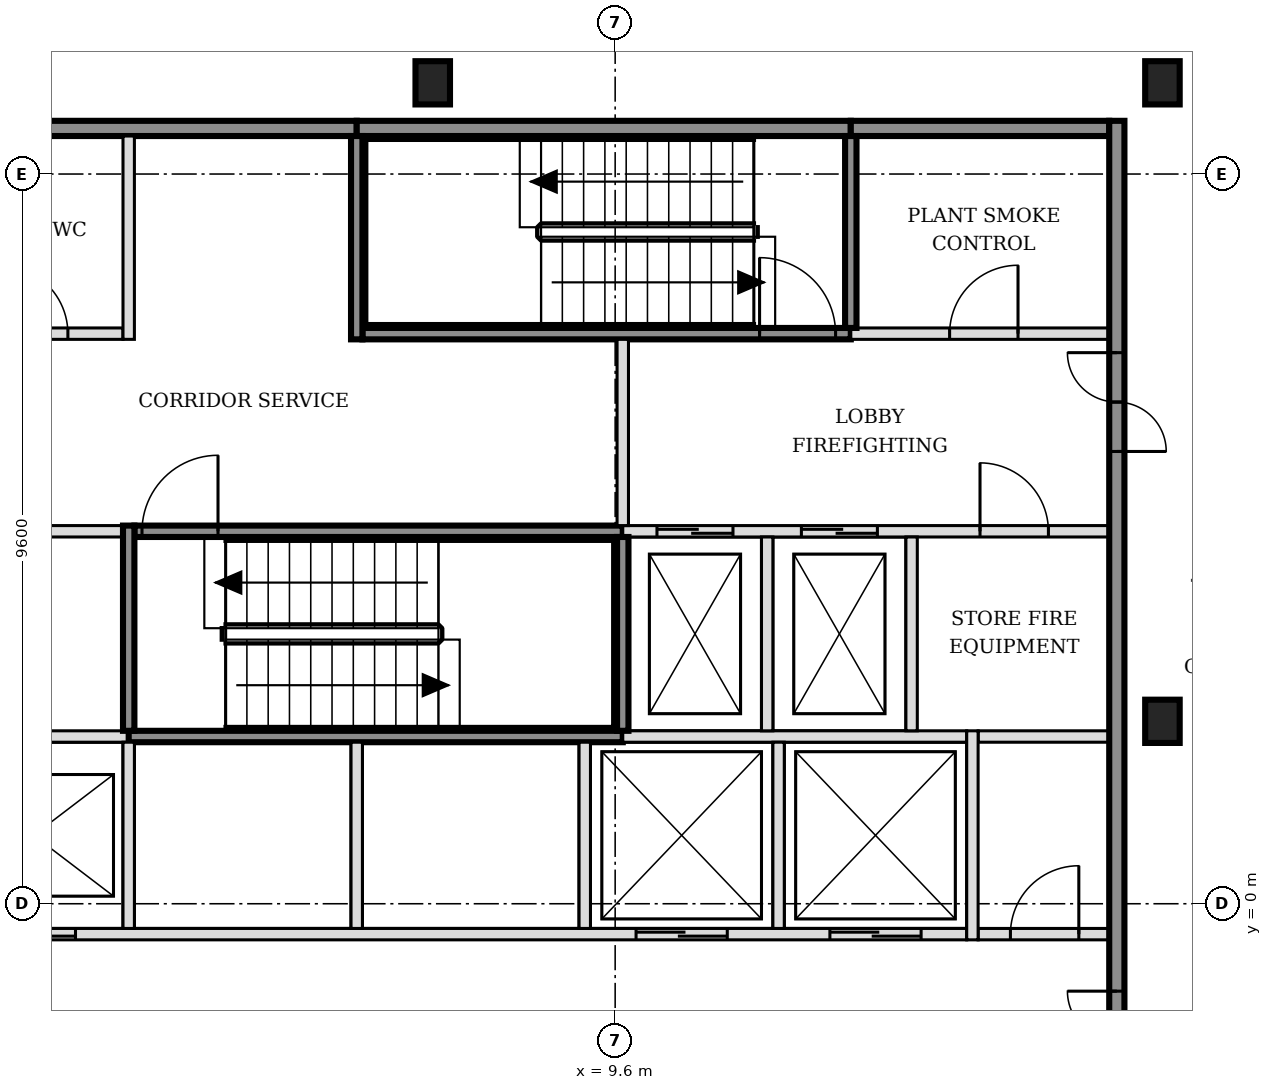
"""IFC4 building model, lengths in metres.
Left out: names, types, materials, properties, quantities, classifications, styles, units other than length and angle.
Written with IfcOpenShell. Run it as: python <this file> out.ifc"""

import sys

from ifc_helpers import new_model, si_unit, direction, frame, frame_2d, origin, origin_2d, place, context, subcontext, project, spatial, rectangle, i_section, extrude, element, fill, save


model = new_model("IFC4")
c1 = context("Model", 3, precision=1e-05, world=origin(), true_north=direction((0.0, 1.0)))
c2 = subcontext(c1, "Body", "Model", "MODEL_VIEW")
j1 = project(units=[si_unit("LENGTHUNIT", "METRE"), si_unit("PLANEANGLEUNIT", "RADIAN")], contexts=[c1])
p1 = place(None, origin())
s1 = spatial("IfcSite", under=j1, at=p1, CompositionType="ELEMENT")
p2 = place(p1, origin())
s2 = spatial("IfcBuilding", under=s1, at=p2, CompositionType="ELEMENT")
p3 = place(p2, frame((0.0, 0.0, 58.2)))
s3 = spatial("IfcBuildingStorey", under=s2, at=p3, CompositionType="ELEMENT", Elevation=58.2)
for number, where, z_axis, x_axis in (
    (1, (16.8, 2.4, -0.15), (0.0, 0.0, 1.0), (1.0, 0.0, 0.0)),
    (2, (7.2, 10.8, -0.15), (0.0, 0.0, 1.0), (1.0, 0.0, 0.0)),
    (3, (16.8, 10.8, -0.15), (0.0, 0.0, 1.0), (1.0, 0.0, 0.0)),
):
    element("IfcColumn", number, at=place(p3, frame(where, z_axis=z_axis, x_axis=x_axis)), inside=s3, PredefinedType="COLUMN", context=c2, shape_type="SweptSolid", body=[
        extrude(i_section(OverallWidth=0.454, OverallDepth=0.569, WebThickness=0.078, FlangeThickness=0.125, FilletRadius=0.015, at=origin_2d()), origin(), (0.0, 0.0, 1.0), 3.6),
    ])
p4 = place(p3, frame((-1.7, -0.4, 0.0), z_axis=(0.0, 0.0, 1.0), x_axis=(1.0, 0.0, 0.0)))
e4 = element("IfcWall", 4, at=p4, inside=s3, PredefinedType="SOLIDWALL", context=c2, shape_type="SweptSolid", body=[
    extrude(rectangle(XDim=15.925, YDim=0.15, at=frame_2d((7.962, 0.0))), origin(), (0.0, 0.0, 1.0), 3.45),
])
p5 = place(p4, frame((0.6, 0.0, 0.0)))
e5 = element("IfcOpeningElement", 5, at=p5, cuts=e4, PredefinedType="OPENING", context=c2, shape_type="SweptSolid", body=[
    extrude(rectangle(XDim=1.1, YDim=2.1, at=frame_2d((0.55, 1.05))), frame((0.0, 0.085, 0.0), z_axis=(0.0, -1.0, 0.0), x_axis=(1.0, 0.0, 0.0)), (0.0, 0.0, 1.0), 0.17),
])
p6 = place(p4, frame((3.1, 0.0, 0.0)))
e6 = element("IfcOpeningElement", 6, at=p6, cuts=e4, PredefinedType="OPENING", context=c2, shape_type="SweptSolid", body=[
    extrude(rectangle(XDim=1.1, YDim=2.1, at=frame_2d((0.55, 1.05))), frame((0.0, 0.085, 0.0), z_axis=(0.0, -1.0, 0.0), x_axis=(1.0, 0.0, 0.0)), (0.0, 0.0, 1.0), 0.17),
])
p7 = place(p4, frame((11.575, 0.0, 0.0)))
e7 = element("IfcOpeningElement", 7, at=p7, cuts=e4, PredefinedType="OPENING", context=c2, shape_type="SweptSolid", body=[
    extrude(rectangle(XDim=1.2, YDim=2.1, at=frame_2d((0.6, 1.05))), frame((0.0, 0.085, 0.0), z_axis=(0.0, -1.0, 0.0), x_axis=(1.0, 0.0, 0.0)), (0.0, 0.0, 1.0), 0.17),
])
p8 = place(p4, frame((14.125, 0.0, 0.0)))
e8 = element("IfcOpeningElement", 8, at=p8, cuts=e4, PredefinedType="OPENING", context=c2, shape_type="SweptSolid", body=[
    extrude(rectangle(XDim=1.2, YDim=2.1, at=frame_2d((0.6, 1.05))), frame((0.0, 0.085, 0.0), z_axis=(0.0, -1.0, 0.0), x_axis=(1.0, 0.0, 0.0)), (0.0, 0.0, 1.0), 0.17),
])
p9 = place(p3, frame((14.375, -0.4, 0.0), z_axis=(0.0, 0.0, 1.0), x_axis=(1.0, 0.0, 0.0)))
e9 = element("IfcWall", 9, at=p9, inside=s3, PredefinedType="PARTITIONING", context=c2, shape_type="SweptSolid", body=[
    extrude(rectangle(XDim=1.725, YDim=0.15, at=frame_2d((0.863, 0.0))), origin(), (0.0, 0.0, 1.0), 3.45),
])
p10 = place(p9, frame((0.425, 0.0, 0.0)))
e10 = element("IfcOpeningElement", 10, at=p10, cuts=e9, PredefinedType="OPENING", context=c2, shape_type="SweptSolid", body=[
    extrude(rectangle(XDim=0.9, YDim=2.1, at=frame_2d((0.45, 1.05))), frame((0.0, 0.085, 0.0), z_axis=(0.0, -1.0, 0.0), x_axis=(1.0, 0.0, 0.0)), (0.0, 0.0, 1.0), 0.17),
])
p11 = place(p3, frame((-1.7, 2.2, 0.0), z_axis=(0.0, 0.0, 1.0), x_axis=(1.0, 0.0, 0.0)))
e11 = element("IfcWall", 11, at=p11, inside=s3, PredefinedType="SOLIDWALL", context=c2, shape_type="SweptSolid", body=[
    extrude(rectangle(XDim=4.9, YDim=0.15, at=frame_2d((2.45, 0.0))), origin(), (0.0, 0.0, 1.0), 3.45),
])
p12 = place(p3, frame((3.2, 2.2, 0.0), z_axis=(0.0, 0.0, 1.0), x_axis=(1.0, 0.0, 0.0)))
e12 = element("IfcWall", 12, at=p12, inside=s3, PredefinedType="SOLIDWALL", context=c2, shape_type="SweptSolid", body=[
    extrude(rectangle(XDim=6.5, YDim=0.15, at=frame_2d((3.25, 0.0))), origin(), (0.0, 0.0, 1.0), 3.45),
])
p13 = place(p3, frame((9.7, 2.2, 0.0), z_axis=(0.0, 0.0, 1.0), x_axis=(1.0, 0.0, 0.0)))
e13 = element("IfcWall", 13, at=p13, inside=s3, PredefinedType="SOLIDWALL", context=c2, shape_type="SweptSolid", body=[
    extrude(rectangle(XDim=4.525, YDim=0.15, at=frame_2d((2.263, 0.0))), origin(), (0.0, 0.0, 1.0), 3.45),
])
p14 = place(p3, frame((14.375, 2.2, 0.0), z_axis=(0.0, 0.0, 1.0), x_axis=(1.0, 0.0, 0.0)))
e14 = element("IfcWall", 14, at=p14, inside=s3, PredefinedType="PARTITIONING", context=c2, shape_type="SweptSolid", body=[
    extrude(rectangle(XDim=1.725, YDim=0.15, at=frame_2d((0.863, 0.0))), origin(), (0.0, 0.0, 1.0), 3.45),
])
p15 = place(p3, frame((-1.7, 4.9, 0.0), z_axis=(0.0, 0.0, 1.0), x_axis=(1.0, 0.0, 0.0)))
e15 = element("IfcWall", 15, at=p15, inside=s3, PredefinedType="PARTITIONING", context=c2, shape_type="SweptSolid", body=[
    extrude(rectangle(XDim=4.825, YDim=0.15, at=frame_2d((2.413, 0.0))), origin(), (0.0, 0.0, 1.0), 3.45),
])
p16 = place(p15, frame((1.95, 0.0, 0.0)))
e16 = element("IfcOpeningElement", 16, at=p16, cuts=e15, PredefinedType="OPENING", context=c2, shape_type="SweptSolid", body=[
    extrude(rectangle(XDim=0.9, YDim=2.1, at=frame_2d((0.45, 1.05))), frame((0.0, 0.085, 0.0), z_axis=(0.0, -1.0, 0.0), x_axis=(1.0, 0.0, 0.0)), (0.0, 0.0, 1.0), 0.17),
])
p17 = place(p3, frame((3.275, 4.9, 0.0), z_axis=(0.0, 0.0, 1.0), x_axis=(1.0, 0.0, 0.0)))
e17 = element("IfcWall", 17, at=p17, inside=s3, PredefinedType="SOLIDWALL", context=c2, shape_type="SweptSolid", body=[
    extrude(rectangle(XDim=6.425, YDim=0.15, at=frame_2d((3.212, 0.0))), origin(), (0.0, 0.0, 1.0), 3.45),
])
p18 = place(p17, frame((0.1, 0.0, 0.0)))
e18 = element("IfcOpeningElement", 18, at=p18, cuts=e17, PredefinedType="OPENING", context=c2, shape_type="SweptSolid", body=[
    extrude(rectangle(XDim=1.0, YDim=2.1, at=frame_2d((0.5, 1.05))), frame((0.0, 0.085, 0.0), z_axis=(0.0, -1.0, 0.0), x_axis=(1.0, 0.0, 0.0)), (0.0, 0.0, 1.0), 0.17),
])
p19 = place(p3, frame((9.7, 4.9, 0.0), z_axis=(0.0, 0.0, 1.0), x_axis=(1.0, 0.0, 0.0)))
e19 = element("IfcWall", 19, at=p19, inside=s3, PredefinedType="SOLIDWALL", context=c2, shape_type="SweptSolid", body=[
    extrude(rectangle(XDim=6.4, YDim=0.15, at=frame_2d((3.2, 0.0))), origin(), (0.0, 0.0, 1.0), 3.45),
])
p20 = place(p19, frame((0.45, 0.0, 0.0)))
e20 = element("IfcOpeningElement", 20, at=p20, cuts=e19, PredefinedType="OPENING", context=c2, shape_type="SweptSolid", body=[
    extrude(rectangle(XDim=1.0, YDim=2.1, at=frame_2d((0.5, 1.05))), frame((0.0, 0.085, 0.0), z_axis=(0.0, -1.0, 0.0), x_axis=(1.0, 0.0, 0.0)), (0.0, 0.0, 1.0), 0.17),
])
p21 = place(p19, frame((2.35, 0.0, 0.0)))
e21 = element("IfcOpeningElement", 21, at=p21, cuts=e19, PredefinedType="OPENING", context=c2, shape_type="SweptSolid", body=[
    extrude(rectangle(XDim=1.0, YDim=2.1, at=frame_2d((0.5, 1.05))), frame((0.0, 0.085, 0.0), z_axis=(0.0, -1.0, 0.0), x_axis=(1.0, 0.0, 0.0)), (0.0, 0.0, 1.0), 0.17),
])
p22 = place(p19, frame((4.7, 0.0, 0.0)))
e22 = element("IfcOpeningElement", 22, at=p22, cuts=e19, PredefinedType="OPENING", context=c2, shape_type="SweptSolid", body=[
    extrude(rectangle(XDim=0.9, YDim=2.1, at=frame_2d((0.45, 1.05))), frame((0.0, 0.085, 0.0), z_axis=(0.0, -1.0, 0.0), x_axis=(1.0, 0.0, 0.0)), (0.0, 0.0, 1.0), 0.17),
])
p23 = place(p3, frame((-1.7, 7.5, 0.0), z_axis=(0.0, 0.0, 1.0), x_axis=(1.0, 0.0, 0.0)))
e23 = element("IfcWall", 23, at=p23, inside=s3, PredefinedType="PARTITIONING", context=c2, shape_type="SweptSolid", body=[
    extrude(rectangle(XDim=4.825, YDim=0.15, at=frame_2d((2.413, 0.0))), origin(), (0.0, 0.0, 1.0), 3.45),
])
p24 = place(p23, frame((0.7, 0.0, 0.0)))
e24 = element("IfcOpeningElement", 24, at=p24, cuts=e23, PredefinedType="OPENING", context=c2, shape_type="SweptSolid", body=[
    extrude(rectangle(XDim=0.9, YDim=2.1, at=frame_2d((0.45, 1.05))), frame((0.0, 0.085, 0.0), z_axis=(0.0, -1.0, 0.0), x_axis=(1.0, 0.0, 0.0)), (0.0, 0.0, 1.0), 0.17),
])
p25 = place(p23, frame((3.2, 0.0, 0.0)))
e25 = element("IfcOpeningElement", 25, at=p25, cuts=e23, PredefinedType="OPENING", context=c2, shape_type="SweptSolid", body=[
    extrude(rectangle(XDim=0.9, YDim=2.1, at=frame_2d((0.45, 1.05))), frame((0.0, 0.085, 0.0), z_axis=(0.0, -1.0, 0.0), x_axis=(1.0, 0.0, 0.0)), (0.0, 0.0, 1.0), 0.17),
])
p26 = place(p3, frame((6.275, 7.5, 0.0), z_axis=(0.0, 0.0, 1.0), x_axis=(1.0, 0.0, 0.0)))
e26 = element("IfcWall", 26, at=p26, inside=s3, PredefinedType="SOLIDWALL", context=c2, shape_type="SweptSolid", body=[
    extrude(rectangle(XDim=6.425, YDim=0.15, at=frame_2d((3.212, 0.0))), origin(), (0.0, 0.0, 1.0), 3.45),
])
p27 = place(p26, frame((5.225, 0.0, 0.0)))
e27 = element("IfcOpeningElement", 27, at=p27, cuts=e26, PredefinedType="OPENING", context=c2, shape_type="SweptSolid", body=[
    extrude(rectangle(XDim=1.0, YDim=2.1, at=frame_2d((0.5, 1.05))), frame((0.0, 0.085, 0.0), z_axis=(0.0, -1.0, 0.0), x_axis=(1.0, 0.0, 0.0)), (0.0, 0.0, 1.0), 0.17),
])
p28 = place(p3, frame((12.7, 7.5, 0.0), z_axis=(0.0, 0.0, 1.0), x_axis=(1.0, 0.0, 0.0)))
e28 = element("IfcWall", 28, at=p28, inside=s3, PredefinedType="SOLIDWALL", context=c2, shape_type="SweptSolid", body=[
    extrude(rectangle(XDim=3.4, YDim=0.15, at=frame_2d((1.7, 0.0))), origin(), (0.0, 0.0, 1.0), 3.45),
])
p29 = place(p28, frame((1.3, 0.0, 0.0)))
e29 = element("IfcOpeningElement", 29, at=p29, cuts=e28, PredefinedType="OPENING", context=c2, shape_type="SweptSolid", body=[
    extrude(rectangle(XDim=0.9, YDim=2.1, at=frame_2d((0.45, 1.05))), frame((0.0, 0.085, 0.0), z_axis=(0.0, -1.0, 0.0), x_axis=(1.0, 0.0, 0.0)), (0.0, 0.0, 1.0), 0.17),
])
p30 = place(p3, frame((-1.7, 10.2, 0.0), z_axis=(0.0, 0.0, 1.0), x_axis=(1.0, 0.0, 0.0)))
e30 = element("IfcWall", 30, at=p30, inside=s3, PredefinedType="SOLIDWALL", context=c2, shape_type="SweptSolid", body=[
    extrude(rectangle(XDim=7.9, YDim=0.2, at=frame_2d((3.95, 0.0))), origin(), (0.0, 0.0, 1.0), 3.45),
])
p31 = place(p3, frame((6.2, 10.2, 0.0), z_axis=(0.0, 0.0, 1.0), x_axis=(1.0, 0.0, 0.0)))
e31 = element("IfcWall", 31, at=p31, inside=s3, PredefinedType="SOLIDWALL", context=c2, shape_type="SweptSolid", body=[
    extrude(rectangle(XDim=6.5, YDim=0.2, at=frame_2d((3.25, 0.0))), origin(), (0.0, 0.0, 1.0), 3.45),
])
p32 = place(p3, frame((12.7, 10.2, 0.0), z_axis=(0.0, 0.0, 1.0), x_axis=(1.0, 0.0, 0.0)))
e32 = element("IfcWall", 32, at=p32, inside=s3, PredefinedType="SOLIDWALL", context=c2, shape_type="SweptSolid", body=[
    extrude(rectangle(XDim=3.4, YDim=0.2, at=frame_2d((1.7, 0.0))), origin(), (0.0, 0.0, 1.0), 3.45),
])
p33 = place(p3, frame((3.2, -0.325, 0.0), z_axis=(0.0, 0.0, 1.0), x_axis=(0.0, 1.0, 0.0)))
e33 = element("IfcWall", 33, at=p33, inside=s3, PredefinedType="SOLIDWALL", context=c2, shape_type="SweptSolid", body=[
    extrude(rectangle(XDim=2.45, YDim=0.15, at=frame_2d((1.225, 0.0))), origin(), (0.0, 0.0, 1.0), 3.45),
])
p34 = place(p3, frame((3.2, 2.275, 0.0), z_axis=(0.0, 0.0, 1.0), x_axis=(0.0, 1.0, 0.0)))
e34 = element("IfcWall", 34, at=p34, inside=s3, PredefinedType="SOLIDWALL", context=c2, shape_type="SweptSolid", body=[
    extrude(rectangle(XDim=2.7, YDim=0.15, at=frame_2d((1.35, 0.0))), origin(), (0.0, 0.0, 1.0), 3.45),
])
p35 = place(p3, frame((3.2, 7.425, 0.0), z_axis=(0.0, 0.0, 1.0), x_axis=(0.0, 1.0, 0.0)))
e35 = element("IfcWall", 35, at=p35, inside=s3, PredefinedType="PARTITIONING", context=c2, shape_type="SweptSolid", body=[
    extrude(rectangle(XDim=2.675, YDim=0.15, at=frame_2d((1.337, 0.0))), origin(), (0.0, 0.0, 1.0), 3.45),
])
p36 = place(p3, frame((6.2, -0.325, 0.0), z_axis=(0.0, 0.0, 1.0), x_axis=(0.0, 1.0, 0.0)))
e36 = element("IfcWall", 36, at=p36, inside=s3, PredefinedType="SOLIDWALL", context=c2, shape_type="SweptSolid", body=[
    extrude(rectangle(XDim=2.45, YDim=0.15, at=frame_2d((1.225, 0.0))), origin(), (0.0, 0.0, 1.0), 3.45),
])
p37 = place(p3, frame((6.2, 7.425, 0.0), z_axis=(0.0, 0.0, 1.0), x_axis=(0.0, 1.0, 0.0)))
e37 = element("IfcWall", 37, at=p37, inside=s3, PredefinedType="SOLIDWALL", context=c2, shape_type="SweptSolid", body=[
    extrude(rectangle(XDim=2.675, YDim=0.15, at=frame_2d((1.337, 0.0))), origin(), (0.0, 0.0, 1.0), 3.45),
])
p38 = place(p3, frame((9.2, -0.325, 0.0), z_axis=(0.0, 0.0, 1.0), x_axis=(0.0, 1.0, 0.0)))
e38 = element("IfcWall", 38, at=p38, inside=s3, PredefinedType="SOLIDWALL", context=c2, shape_type="SweptSolid", body=[
    extrude(rectangle(XDim=2.45, YDim=0.15, at=frame_2d((1.225, 0.0))), origin(), (0.0, 0.0, 1.0), 3.45),
])
p39 = place(p3, frame((9.7, 2.275, 0.0), z_axis=(0.0, 0.0, 1.0), x_axis=(0.0, 1.0, 0.0)))
e39 = element("IfcWall", 39, at=p39, inside=s3, PredefinedType="SOLIDWALL", context=c2, shape_type="SweptSolid", body=[
    extrude(rectangle(XDim=2.55, YDim=0.15, at=frame_2d((1.275, 0.0))), origin(), (0.0, 0.0, 1.0), 3.45),
])
p40 = place(p3, frame((9.7, 4.975, 0.0), z_axis=(0.0, 0.0, 1.0), x_axis=(0.0, 1.0, 0.0)))
e40 = element("IfcWall", 40, at=p40, inside=s3, PredefinedType="SOLIDWALL", context=c2, shape_type="SweptSolid", body=[
    extrude(rectangle(XDim=2.45, YDim=0.15, at=frame_2d((1.225, 0.0))), origin(), (0.0, 0.0, 1.0), 3.45),
])
p41 = place(p3, frame((11.6, 2.275, 0.0), z_axis=(0.0, 0.0, 1.0), x_axis=(0.0, 1.0, 0.0)))
e41 = element("IfcWall", 41, at=p41, inside=s3, PredefinedType="SOLIDWALL", context=c2, shape_type="SweptSolid", body=[
    extrude(rectangle(XDim=2.55, YDim=0.15, at=frame_2d((1.275, 0.0))), origin(), (0.0, 0.0, 1.0), 3.45),
])
p42 = place(p3, frame((11.75, -0.325, 0.0), z_axis=(0.0, 0.0, 1.0), x_axis=(0.0, 1.0, 0.0)))
e42 = element("IfcWall", 42, at=p42, inside=s3, PredefinedType="SOLIDWALL", context=c2, shape_type="SweptSolid", body=[
    extrude(rectangle(XDim=2.45, YDim=0.15, at=frame_2d((1.225, 0.0))), origin(), (0.0, 0.0, 1.0), 3.45),
])
p43 = place(p3, frame((12.7, 7.575, 0.0), z_axis=(0.0, 0.0, 1.0), x_axis=(0.0, 1.0, 0.0)))
e43 = element("IfcWall", 43, at=p43, inside=s3, PredefinedType="SOLIDWALL", context=c2, shape_type="SweptSolid", body=[
    extrude(rectangle(XDim=2.525, YDim=0.15, at=frame_2d((1.263, 0.0))), origin(), (0.0, 0.0, 1.0), 3.45),
])
p44 = place(p3, frame((13.5, 2.275, 0.0), z_axis=(0.0, 0.0, 1.0), x_axis=(0.0, 1.0, 0.0)))
e44 = element("IfcWall", 44, at=p44, inside=s3, PredefinedType="SOLIDWALL", context=c2, shape_type="SweptSolid", body=[
    extrude(rectangle(XDim=2.55, YDim=0.15, at=frame_2d((1.275, 0.0))), origin(), (0.0, 0.0, 1.0), 3.45),
])
p45 = place(p3, frame((14.3, -0.475, 0.0), z_axis=(0.0, 0.0, 1.0), x_axis=(0.0, 1.0, 0.0)))
e45 = element("IfcWall", 45, at=p45, inside=s3, PredefinedType="SOLIDWALL", context=c2, shape_type="SweptSolid", body=[
    extrude(rectangle(XDim=2.75, YDim=0.15, at=frame_2d((1.375, 0.0))), origin(), (0.0, 0.0, 1.0), 3.45),
])
p46 = place(p3, frame((16.2, -5.5, 0.0), z_axis=(0.0, 0.0, 1.0), x_axis=(0.0, 1.0, 0.0)))
e46 = element("IfcWall", 46, at=p46, inside=s3, PredefinedType="SOLIDWALL", context=c2, shape_type="SweptSolid", body=[
    extrude(rectangle(XDim=15.8, YDim=0.2, at=frame_2d((7.9, 0.0))), origin(), (0.0, 0.0, 1.0), 3.45),
])
p47 = place(p46, frame((3.05, 0.0, 0.0)))
e47 = element("IfcOpeningElement", 47, at=p47, cuts=e46, PredefinedType="OPENING", context=c2, shape_type="SweptSolid", body=[
    extrude(rectangle(XDim=1.3, YDim=2.1, at=frame_2d((0.65, 1.05))), frame((0.0, 0.11, 0.0), z_axis=(0.0, -1.0, 0.0), x_axis=(1.0, 0.0, 0.0)), (0.0, 0.0, 1.0), 0.22),
])
p48 = place(p46, frame((11.45, 0.0, 0.0)))
e48 = element("IfcOpeningElement", 48, at=p48, cuts=e46, PredefinedType="OPENING", context=c2, shape_type="SweptSolid", body=[
    extrude(rectangle(XDim=1.3, YDim=2.1, at=frame_2d((0.65, 1.05))), frame((0.0, 0.11, 0.0), z_axis=(0.0, -1.0, 0.0), x_axis=(1.0, 0.0, 0.0)), (0.0, 0.0, 1.0), 0.22),
])
p49 = place(p6, origin())
e49 = element("IfcDoor", 49, at=p49, inside=s3, OperationType="DOUBLE_DOOR_SLIDING", PredefinedType="DOOR", context=c2, shape_type="SweptSolid", body=[
    extrude(rectangle(XDim=1.1, YDim=2.1, at=frame_2d((0.55, 1.05))), frame((0.0, 0.025, 0.0), z_axis=(0.0, -1.0, 0.0), x_axis=(1.0, 0.0, 0.0)), (0.0, 0.0, 1.0), 0.05),
])
fill(e6, e49)
p50 = place(p7, origin())
e50 = element("IfcDoor", 50, at=p50, inside=s3, OperationType="DOUBLE_DOOR_SLIDING", PredefinedType="DOOR", context=c2, shape_type="SweptSolid", body=[
    extrude(rectangle(XDim=1.2, YDim=2.1, at=frame_2d((0.6, 1.05))), frame((0.0, 0.025, 0.0), z_axis=(0.0, -1.0, 0.0), x_axis=(1.0, 0.0, 0.0)), (0.0, 0.0, 1.0), 0.05),
])
fill(e7, e50)
p51 = place(p8, origin())
e51 = element("IfcDoor", 51, at=p51, inside=s3, OperationType="DOUBLE_DOOR_SLIDING", PredefinedType="DOOR", context=c2, shape_type="SweptSolid", body=[
    extrude(rectangle(XDim=1.2, YDim=2.1, at=frame_2d((0.6, 1.05))), frame((0.0, 0.025, 0.0), z_axis=(0.0, -1.0, 0.0), x_axis=(1.0, 0.0, 0.0)), (0.0, 0.0, 1.0), 0.05),
])
fill(e8, e51)
p52 = place(p20, origin())
e52 = element("IfcDoor", 52, at=p52, inside=s3, OperationType="DOUBLE_DOOR_SLIDING", PredefinedType="DOOR", context=c2, shape_type="SweptSolid", body=[
    extrude(rectangle(XDim=1.0, YDim=2.1, at=frame_2d((0.5, 1.05))), frame((0.0, 0.025, 0.0), z_axis=(0.0, -1.0, 0.0), x_axis=(1.0, 0.0, 0.0)), (0.0, 0.0, 1.0), 0.05),
])
fill(e20, e52)
p53 = place(p21, origin())
e53 = element("IfcDoor", 53, at=p53, inside=s3, OperationType="DOUBLE_DOOR_SLIDING", PredefinedType="DOOR", context=c2, shape_type="SweptSolid", body=[
    extrude(rectangle(XDim=1.0, YDim=2.1, at=frame_2d((0.5, 1.05))), frame((0.0, 0.025, 0.0), z_axis=(0.0, -1.0, 0.0), x_axis=(1.0, 0.0, 0.0)), (0.0, 0.0, 1.0), 0.05),
])
fill(e21, e53)
p54 = place(p18, origin())
e54 = element("IfcDoor", 54, at=p54, inside=s3, OperationType="SINGLE_SWING_RIGHT", PredefinedType="DOOR", context=c2, shape_type="SweptSolid", body=[
    extrude(rectangle(XDim=1.0, YDim=2.1, at=frame_2d((0.5, 1.05))), frame((0.0, 0.025, 0.0), z_axis=(0.0, -1.0, 0.0), x_axis=(1.0, 0.0, 0.0)), (0.0, 0.0, 1.0), 0.05),
])
fill(e18, e54)
p55 = place(p27, origin())
e55 = element("IfcDoor", 55, at=p55, inside=s3, OperationType="SINGLE_SWING_LEFT", PredefinedType="DOOR", context=c2, shape_type="SweptSolid", body=[
    extrude(rectangle(XDim=1.0, YDim=2.1, at=frame_2d((0.5, 1.05))), frame((0.0, 0.025, 0.0), z_axis=(0.0, -1.0, 0.0), x_axis=(1.0, 0.0, 0.0)), (0.0, 0.0, 1.0), 0.05),
])
fill(e27, e55)
p56 = place(p47, origin())
e56 = element("IfcDoor", 56, at=p56, inside=s3, OperationType="DOUBLE_DOOR_SINGLE_SWING", PredefinedType="DOOR", context=c2, shape_type="SweptSolid", body=[
    extrude(rectangle(XDim=1.3, YDim=2.1, at=frame_2d((0.65, 1.05))), frame((0.0, 0.025, 0.0), z_axis=(0.0, -1.0, 0.0), x_axis=(1.0, 0.0, 0.0)), (0.0, 0.0, 1.0), 0.05),
])
fill(e47, e56)
p57 = place(p48, origin())
e57 = element("IfcDoor", 57, at=p57, inside=s3, OperationType="DOUBLE_DOOR_SINGLE_SWING", PredefinedType="DOOR", context=c2, shape_type="SweptSolid", body=[
    extrude(rectangle(XDim=1.3, YDim=2.1, at=frame_2d((0.65, 1.05))), frame((0.0, 0.025, 0.0), z_axis=(0.0, -1.0, 0.0), x_axis=(1.0, 0.0, 0.0)), (0.0, 0.0, 1.0), 0.05),
])
fill(e48, e57)
p58 = place(p10, origin())
e58 = element("IfcDoor", 58, at=p58, inside=s3, OperationType="SINGLE_SWING_RIGHT", PredefinedType="DOOR", context=c2, shape_type="SweptSolid", body=[
    extrude(rectangle(XDim=0.9, YDim=2.1, at=frame_2d((0.45, 1.05))), frame((0.0, 0.025, 0.0), z_axis=(0.0, -1.0, 0.0), x_axis=(1.0, 0.0, 0.0)), (0.0, 0.0, 1.0), 0.05),
])
fill(e10, e58)
p59 = place(p22, origin())
e59 = element("IfcDoor", 59, at=p59, inside=s3, OperationType="SINGLE_SWING_LEFT", PredefinedType="DOOR", context=c2, shape_type="SweptSolid", body=[
    extrude(rectangle(XDim=0.9, YDim=2.1, at=frame_2d((0.45, 1.05))), frame((0.0, 0.025, 0.0), z_axis=(0.0, -1.0, 0.0), x_axis=(1.0, 0.0, 0.0)), (0.0, 0.0, 1.0), 0.05),
])
fill(e22, e59)
p60 = place(p29, origin())
e60 = element("IfcDoor", 60, at=p60, inside=s3, OperationType="SINGLE_SWING_RIGHT", PredefinedType="DOOR", context=c2, shape_type="SweptSolid", body=[
    extrude(rectangle(XDim=0.9, YDim=2.1, at=frame_2d((0.45, 1.05))), frame((0.0, 0.025, 0.0), z_axis=(0.0, -1.0, 0.0), x_axis=(1.0, 0.0, 0.0)), (0.0, 0.0, 1.0), 0.05),
])
fill(e29, e60)
p61 = place(p25, origin())
e61 = element("IfcDoor", 61, at=p61, inside=s3, OperationType="SINGLE_SWING_LEFT", PredefinedType="DOOR", context=c2, shape_type="SweptSolid", body=[
    extrude(rectangle(XDim=0.9, YDim=2.1, at=frame_2d((0.45, 1.05))), frame((0.0, 0.025, 0.0), z_axis=(0.0, -1.0, 0.0), x_axis=(1.0, 0.0, 0.0)), (0.0, 0.0, 1.0), 0.05),
])
fill(e25, e61)
save(model, sys.argv[1])
